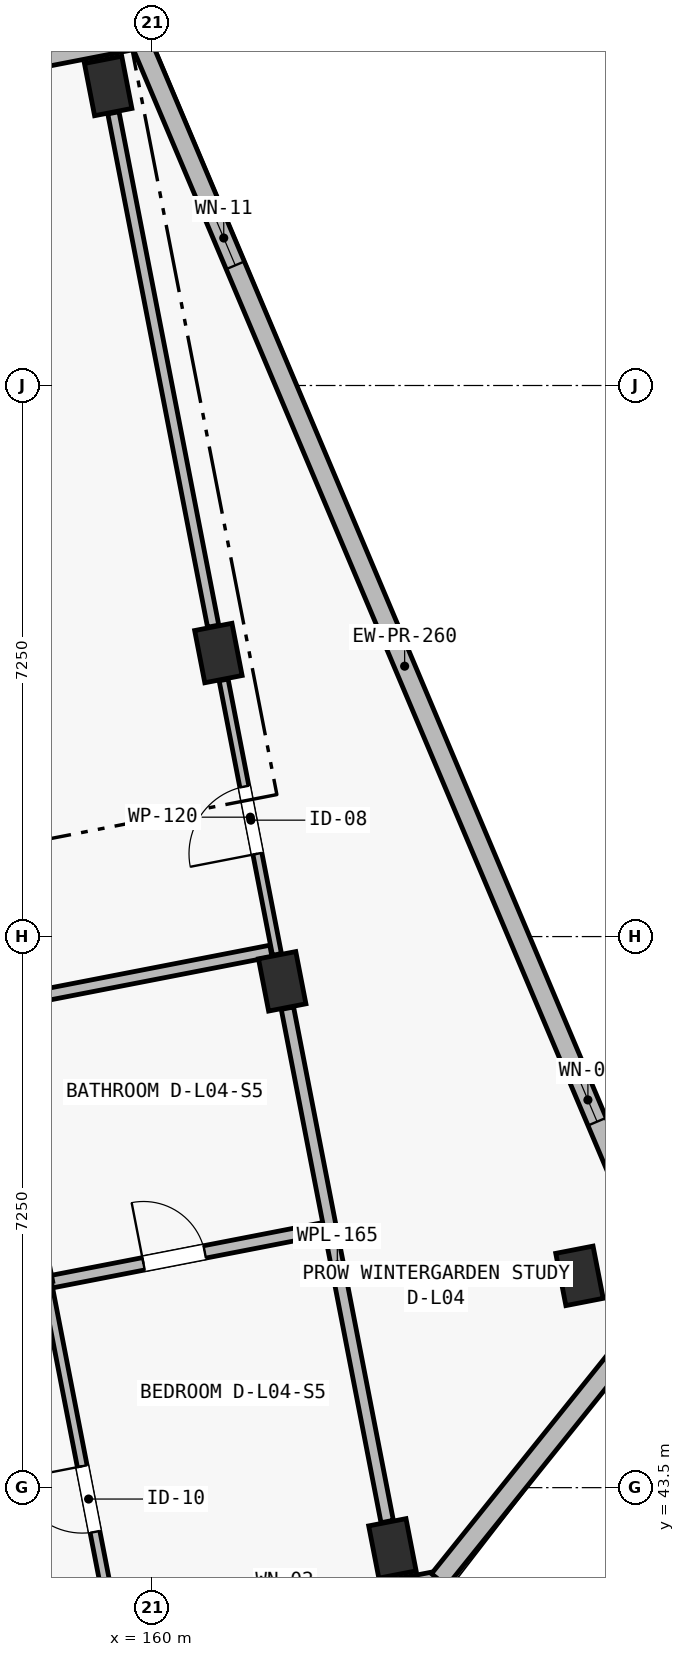
"""IFC4 building model, lengths in metres.
Left out: names, types, materials, properties, quantities, classifications, styles, units other than length and angle.
Written with IfcOpenShell. Run it as: python <this file> out.ifc"""

import sys

from ifc_helpers import new_model, si_unit, direction, frame, frame_2d, origin, origin_2d, place, context, subcontext, project, spatial, rectangle, extrude, element, fill, save


model = new_model("IFC4")
c1 = context("Model", 3, precision=1e-05, world=origin(), true_north=direction((0.0, 1.0)))
c2 = subcontext(c1, "Body", "Model", "MODEL_VIEW")
j1 = project(units=[si_unit("LENGTHUNIT", "METRE"), si_unit("PLANEANGLEUNIT", "RADIAN")], contexts=[c1])
p1 = place(None, origin())
s1 = spatial("IfcSite", under=j1, at=p1, CompositionType="ELEMENT")
p2 = place(p1, origin())
s2 = spatial("IfcBuilding", under=s1, at=p2, CompositionType="ELEMENT")
p3 = place(p2, frame((0.0, 0.0, 14.9)))
s3 = spatial("IfcBuildingStorey", under=s2, at=p3, CompositionType="ELEMENT", Elevation=14.9)
for number, where, z_axis, x_axis in (
    (1, (163.162, 42.701, 0.0), (0.0, 0.0, 1.0), (0.982, 0.191, 0.0)),
    (2, (161.712, 50.161, 0.0), (0.0, 0.0, 1.0), (0.982, 0.191, 0.0)),
    (3, (160.873, 54.48, 0.0), (0.0, 0.0, 1.0), (0.982, 0.191, 0.0)),
    (4, (159.422, 61.941, 0.0), (0.0, 0.0, 1.0), (0.982, 0.191, 0.0)),
    (5, (165.623, 46.286, 0.0), (0.0, 0.0, 1.0), (0.982, 0.191, 0.0)),
):
    element("IfcColumn", number, at=place(p3, frame(where, z_axis=z_axis, x_axis=x_axis)), inside=s3, PredefinedType="COLUMN", context=c2, shape_type="SweptSolid", body=[
        extrude(rectangle(XDim=0.5, YDim=0.7, at=origin_2d()), origin(), (0.0, 0.0, 1.0), 3.25),
    ])
p4 = place(p3, frame((163.778, 42.286, 0.0), z_axis=(0.0, 0.0, 1.0), x_axis=(-0.981628367112, -0.190802905848, 0.0)))
e6 = element("IfcWall", 6, at=p4, inside=s3, PredefinedType="SOLIDWALL", context=c2, shape_type="SweptSolid", body=[
    extrude(rectangle(XDim=8.125, YDim=0.24, at=frame_2d((4.062, 0.0))), origin(), (0.0, 0.0, 1.0), 3.0),
])
p5 = place(p4, frame((1.773, 0.0, 0.42)))
e7 = element("IfcOpeningElement", 7, at=p5, cuts=e6, PredefinedType="OPENING", context=c2, shape_type="SweptSolid", body=[
    extrude(rectangle(XDim=0.6, YDim=2.22, at=frame_2d((0.3, 1.11))), frame((0.0, 0.135, 0.0), z_axis=(0.0, -1.0, 0.0), x_axis=(1.0, 0.0, 0.0)), (0.0, 0.0, 1.0), 0.27),
])
p6 = place(p4, frame((5.373, 0.0, 0.42)))
e8 = element("IfcOpeningElement", 8, at=p6, cuts=e6, PredefinedType="OPENING", context=c2, shape_type="SweptSolid", body=[
    extrude(rectangle(XDim=0.66, YDim=2.32, at=frame_2d((0.33, 1.16))), frame((0.0, 0.135, 0.0), z_axis=(0.0, -1.0, 0.0), x_axis=(1.0, 0.0, 0.0)), (0.0, 0.0, 1.0), 0.27),
])
p7 = place(p4, frame((6.835, 0.0, 0.48)))
e9 = element("IfcOpeningElement", 9, at=p7, cuts=e6, PredefinedType="OPENING", context=c2, shape_type="SweptSolid", body=[
    extrude(rectangle(XDim=0.68, YDim=2.24, at=frame_2d((0.34, 1.12))), frame((0.0, 0.135, 0.0), z_axis=(0.0, -1.0, 0.0), x_axis=(1.0, 0.0, 0.0)), (0.0, 0.0, 1.0), 0.27),
])
p8 = place(p3, frame((151.862, 61.006, 0.0), z_axis=(0.0, 0.0, 1.0), x_axis=(0.981627273155, 0.190808533872, 0.0)))
e10 = element("IfcWall", 10, at=p8, inside=s3, PredefinedType="SOLIDWALL", context=c2, shape_type="SweptSolid", body=[
    extrude(rectangle(XDim=8.125, YDim=0.24, at=frame_2d((4.062, 0.0))), origin(), (0.0, 0.0, 1.0), 3.0),
])
p9 = place(p3, frame((159.837, 62.556, 0.0), z_axis=(0.0, 0.0, 1.0), x_axis=(0.389225507936, -0.921142499276, 0.0)))
e11 = element("IfcWall", 11, at=p9, inside=s3, PredefinedType="SOLIDWALL", context=c2, shape_type="SweptSolid", body=[
    extrude(rectangle(XDim=17.91, YDim=0.26, at=frame_2d((8.955, 0.0))), origin(), (0.0, 0.0, 1.0), 3.0),
])
p10 = place(p9, frame((2.45, 0.0, 0.45)))
e12 = element("IfcOpeningElement", 12, at=p10, cuts=e11, PredefinedType="OPENING", context=c2, shape_type="SweptSolid", body=[
    extrude(rectangle(XDim=0.78, YDim=2.2, at=frame_2d((0.39, 1.1))), frame((0.0, 0.145, 0.0), z_axis=(0.0, -1.0, 0.0), x_axis=(1.0, 0.0, 0.0)), (0.0, 0.0, 1.0), 0.29),
])
p11 = place(p9, frame((14.84, 0.0, 0.52)))
e13 = element("IfcOpeningElement", 13, at=p11, cuts=e11, PredefinedType="OPENING", context=c2, shape_type="SweptSolid", body=[
    extrude(rectangle(XDim=0.62, YDim=2.28, at=frame_2d((0.31, 1.14))), frame((0.0, 0.145, 0.0), z_axis=(0.0, -1.0, 0.0), x_axis=(1.0, 0.0, 0.0)), (0.0, 0.0, 1.0), 0.29),
])
p12 = place(p3, frame((166.809, 46.058, 0.0), z_axis=(0.0, 0.0, 1.0), x_axis=(-0.626281072923, -0.779597343312, 0.0)))
e14 = element("IfcWall", 14, at=p12, inside=s3, PredefinedType="SOLIDWALL", context=c2, shape_type="SweptSolid", body=[
    extrude(rectangle(XDim=4.839, YDim=0.26, at=frame_2d((2.42, 0.0))), origin(), (0.0, 0.0, 1.0), 3.0),
])
p13 = place(p3, frame((161.643, 50.515, 0.0), z_axis=(0.0, 0.0, 1.0), x_axis=(-0.190805731561, 0.981627817864, 0.0)))
e15 = element("IfcWall", 15, at=p13, inside=s3, PredefinedType="PARTITIONING", context=c2, shape_type="SweptSolid", body=[
    extrude(rectangle(XDim=3.68, YDim=0.12, at=frame_2d((1.84, 0.0))), origin(), (0.0, 0.0, 1.0), 2.5),
])
p14 = place(p13, frame((1.35, 0.0, 0.0)))
e16 = element("IfcOpeningElement", 16, at=p14, cuts=e15, PredefinedType="OPENING", context=c2, shape_type="SweptSolid", body=[
    extrude(rectangle(XDim=0.9, YDim=2.1, at=frame_2d((0.45, 1.05))), frame((0.0, 0.075, 0.0), z_axis=(0.0, -1.0, 0.0), x_axis=(1.0, 0.0, 0.0)), (0.0, 0.0, 1.0), 0.15),
])
p15 = place(p3, frame((160.804, 54.834, 0.0), z_axis=(0.0, 0.0, 1.0), x_axis=(-0.190804123115, 0.981628130507, 0.0)))
e17 = element("IfcWall", 17, at=p15, inside=s3, PredefinedType="PARTITIONING", context=c2, shape_type="SweptSolid", body=[
    extrude(rectangle(XDim=6.88, YDim=0.15, at=frame_2d((3.44, 0.0))), origin(), (0.0, 0.0, 1.0), 2.5),
])
p16 = place(p3, frame((163.094, 43.054, 0.0), z_axis=(0.0, 0.0, 1.0), x_axis=(-0.190804123115, 0.981628130507, 0.0)))
e18 = element("IfcWall", 18, at=p16, inside=s3, PredefinedType="PLUMBINGWALL", context=c2, shape_type="SweptSolid", body=[
    extrude(rectangle(XDim=6.88, YDim=0.165, at=frame_2d((3.44, 0.0))), origin(), (0.0, 0.0, 1.0), 2.5),
])
p17 = place(p3, frame((154.427, 49.173, 0.0), z_axis=(0.0, 0.0, 1.0), x_axis=(0.981626748283, 0.190811234092, 0.0)))
e19 = element("IfcWall", 19, at=p17, inside=s3, PredefinedType="PARTITIONING", context=c2, shape_type="SweptSolid", body=[
    extrude(rectangle(XDim=7.27, YDim=0.155, at=frame_2d((3.635, 0.0))), origin(), (0.0, 0.0, 1.0), 2.97),
])
p18 = place(p17, frame((1.33, 0.0, 0.0)))
e20 = element("IfcOpeningElement", 20, at=p18, cuts=e19, PredefinedType="OPENING", context=c2, shape_type="SweptSolid", body=[
    extrude(rectangle(XDim=1.02, YDim=2.2, at=frame_2d((0.51, 1.1))), frame((0.0, 0.093, 0.0), z_axis=(0.0, -1.0, 0.0), x_axis=(1.0, 0.0, 0.0)), (0.0, 0.0, 1.0), 0.185),
])
p19 = place(p3, frame((158.612, 46.197, 0.0), z_axis=(0.0, 0.0, 1.0), x_axis=(0.981621896267, 0.190836193549, 0.0)))
e21 = element("IfcWall", 21, at=p19, inside=s3, PredefinedType="PLUMBINGWALL", context=c2, shape_type="SweptSolid", body=[
    extrude(rectangle(XDim=3.71, YDim=0.165, at=frame_2d((1.855, 0.0))), origin(), (0.0, 0.0, 1.0), 2.97),
])
p20 = place(p19, frame((1.3, 0.0, 0.0)))
e22 = element("IfcOpeningElement", 22, at=p20, cuts=e21, PredefinedType="OPENING", context=c2, shape_type="SweptSolid", body=[
    extrude(rectangle(XDim=0.82, YDim=2.08, at=frame_2d((0.41, 1.04))), frame((0.0, 0.097, 0.0), z_axis=(0.0, -1.0, 0.0), x_axis=(1.0, 0.0, 0.0)), (0.0, 0.0, 1.0), 0.195),
])
p21 = place(p3, frame((159.506, 41.593, 0.0), z_axis=(0.0, 0.0, 1.0), x_axis=(-0.190787451574, 0.981631370893, 0.0)))
e23 = element("IfcWall", 23, at=p21, inside=s3, PredefinedType="PARTITIONING", context=c2, shape_type="SweptSolid", body=[
    extrude(rectangle(XDim=4.69, YDim=0.13, at=frame_2d((2.345, 0.0))), origin(), (0.0, 0.0, 1.0), 2.97),
])
p22 = place(p21, frame((1.35, 0.0, 0.0)))
e24 = element("IfcOpeningElement", 24, at=p22, cuts=e23, PredefinedType="OPENING", context=c2, shape_type="SweptSolid", body=[
    extrude(rectangle(XDim=0.88, YDim=2.1, at=frame_2d((0.44, 1.05))), frame((0.0, 0.08, 0.0), z_axis=(0.0, -1.0, 0.0), x_axis=(1.0, 0.0, 0.0)), (0.0, 0.0, 1.0), 0.16),
])
p23 = place(p3, frame((158.612, 46.197, 0.0), z_axis=(0.0, 0.0, 1.0), x_axis=(-0.190850336204, 0.981619146701, 0.0)))
e25 = element("IfcWall", 25, at=p23, inside=s3, PredefinedType="PLUMBINGWALL", context=c2, shape_type="SweptSolid", body=[
    extrude(rectangle(XDim=3.72, YDim=0.165, at=frame_2d((1.86, 0.0))), origin(), (0.0, 0.0, 1.0), 2.97),
])
p24 = place(p10, origin())
e26 = element("IfcWindow", 26, at=p24, inside=s3, PartitioningType="SINGLE_PANEL", PredefinedType="WINDOW", context=c2, shape_type="SweptSolid", body=[
    extrude(rectangle(XDim=0.78, YDim=2.2, at=frame_2d((0.39, 1.1))), frame((0.0, 0.03, 0.0), z_axis=(0.0, -1.0, 0.0), x_axis=(1.0, 0.0, 0.0)), (0.0, 0.0, 1.0), 0.06),
])
fill(e12, e26)
p25 = place(p11, origin())
e27 = element("IfcWindow", 27, at=p25, inside=s3, PartitioningType="SINGLE_PANEL", PredefinedType="WINDOW", context=c2, shape_type="SweptSolid", body=[
    extrude(rectangle(XDim=0.62, YDim=2.28, at=frame_2d((0.31, 1.14))), frame((0.0, 0.03, 0.0), z_axis=(0.0, -1.0, 0.0), x_axis=(1.0, 0.0, 0.0)), (0.0, 0.0, 1.0), 0.06),
])
fill(e13, e27)
p26 = place(p14, origin())
e28 = element("IfcDoor", 28, at=p26, inside=s3, OperationType="SINGLE_SWING_LEFT", PredefinedType="DOOR", context=c2, shape_type="SweptSolid", body=[
    extrude(rectangle(XDim=0.9, YDim=2.1, at=frame_2d((0.45, 1.05))), frame((0.0, 0.025, 0.0), z_axis=(0.0, -1.0, 0.0), x_axis=(1.0, 0.0, 0.0)), (0.0, 0.0, 1.0), 0.05),
])
fill(e16, e28)
p27 = place(p20, origin())
e29 = element("IfcDoor", 29, at=p27, inside=s3, OperationType="SINGLE_SWING_LEFT", PredefinedType="DOOR", context=c2, shape_type="SweptSolid", body=[
    extrude(rectangle(XDim=0.82, YDim=2.08, at=frame_2d((0.41, 1.04))), frame((0.0, 0.025, 0.0), z_axis=(0.0, -1.0, 0.0), x_axis=(1.0, 0.0, 0.0)), (0.0, 0.0, 1.0), 0.05),
])
fill(e22, e29)
p28 = place(p22, origin())
e30 = element("IfcDoor", 30, at=p28, inside=s3, OperationType="SINGLE_SWING_RIGHT", PredefinedType="DOOR", context=c2, shape_type="SweptSolid", body=[
    extrude(rectangle(XDim=0.88, YDim=2.1, at=frame_2d((0.44, 1.05))), frame((0.0, 0.025, 0.0), z_axis=(0.0, -1.0, 0.0), x_axis=(1.0, 0.0, 0.0)), (0.0, 0.0, 1.0), 0.05),
])
fill(e24, e30)
save(model, sys.argv[1])
